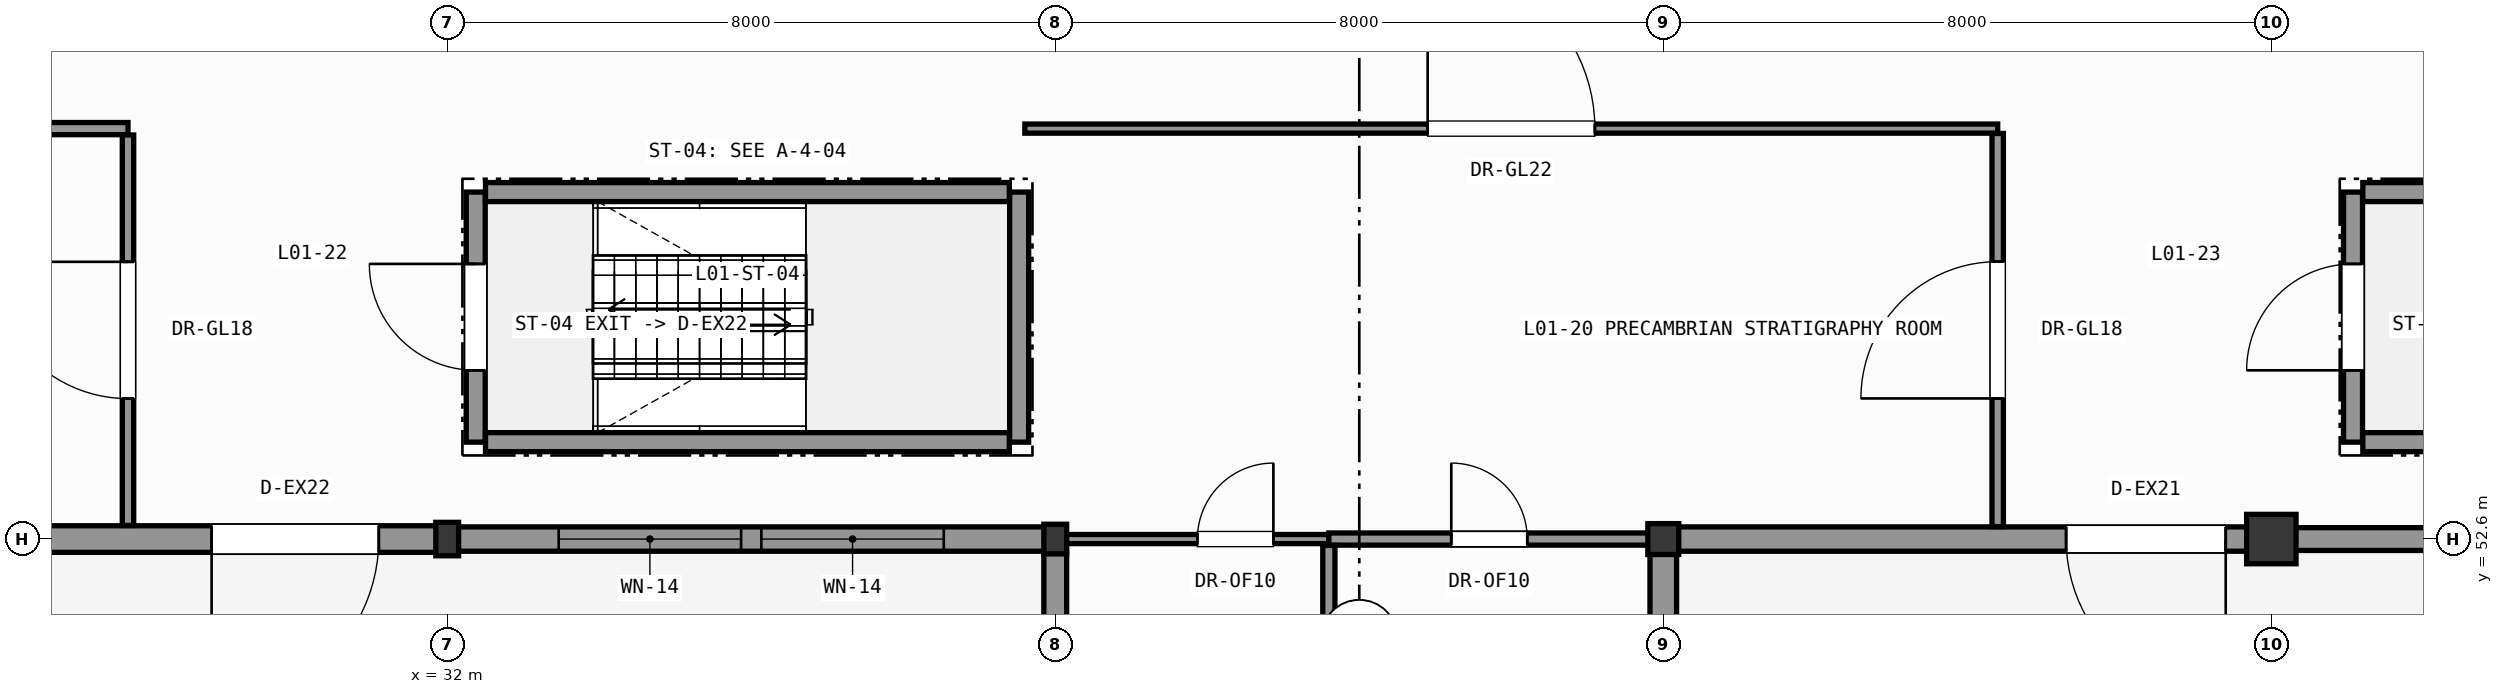
"""IFC4 building model, lengths in metres.
Left out: names, types, materials, properties, quantities, classifications, styles, units other than length and angle.
Written with IfcOpenShell. Run it as: python <this file> out.ifc"""

import sys

from ifc_helpers import new_model, si_unit, direction, frame, frame_2d, origin, origin_2d, place, context, subcontext, project, spatial, rectangle, hollow_circle, i_section, extrude, element, fill, save


model = new_model("IFC4")
c1 = context("Model", 3, precision=1e-05, world=origin(), true_north=direction((0.0, 1.0)))
c2 = subcontext(c1, "Body", "Model", "MODEL_VIEW")
j1 = project(units=[si_unit("LENGTHUNIT", "METRE"), si_unit("PLANEANGLEUNIT", "RADIAN")], contexts=[c1])
p1 = place(None, origin())
s1 = spatial("IfcSite", under=j1, at=p1, CompositionType="ELEMENT")
p2 = place(p1, origin())
s2 = spatial("IfcBuilding", under=s1, at=p2, CompositionType="ELEMENT")
p3 = place(p2, origin())
s3 = spatial("IfcBuildingStorey", under=s2, at=p3, CompositionType="ELEMENT", Elevation=0.0)
p4 = place(p3, frame((32.0, 52.6, 0.0), z_axis=(0.0, 0.0, 1.0), x_axis=(1.0, 0.0, 0.0)))
e1 = element("IfcColumn", 1, at=p4, inside=s3, PredefinedType="COLUMN", context=c2, shape_type="SweptSolid", body=[
    extrude(i_section(OverallWidth=0.3, OverallDepth=0.44, WebThickness=0.011, FlangeThickness=0.021, FilletRadius=0.027, at=origin_2d()), origin(), (0.0, 0.0, 1.0), 7.8),
])
p5 = place(p3, frame((40.0, 52.6, 0.0), z_axis=(0.0, 0.0, 1.0), x_axis=(1.0, 0.0, 0.0)))
e2 = element("IfcColumn", 2, at=p5, inside=s3, PredefinedType="COLUMN", context=c2, shape_type="SweptSolid", body=[
    extrude(i_section(OverallWidth=0.3, OverallDepth=0.39, WebThickness=0.011, FlangeThickness=0.019, FilletRadius=0.027, at=origin_2d()), origin(), (0.0, 0.0, 1.0), 7.8),
])
p6 = place(p3, frame((48.0, 52.6, 0.0), z_axis=(0.0, 0.0, 1.0), x_axis=(1.0, 0.0, 0.0)))
e3 = element("IfcColumn", 3, at=p6, inside=s3, PredefinedType="COLUMN", context=c2, shape_type="SweptSolid", body=[
    extrude(hollow_circle(Radius=0.203, WallThickness=0.02, at=origin_2d()), origin(), (0.0, 0.0, 1.0), 7.8),
])
p7 = place(p3, frame((56.0, 52.6, 0.0), z_axis=(0.0, 0.0, 1.0), x_axis=(1.0, 0.0, 0.0)))
e4 = element("IfcColumn", 4, at=p7, inside=s3, PredefinedType="PILASTER", context=c2, shape_type="SweptSolid", body=[
    extrude(rectangle(XDim=0.65, YDim=0.65, at=origin_2d()), origin(), (0.0, 0.0, 1.0), 7.8),
])
p8 = place(p3, frame((32.0, 52.6, 0.0), z_axis=(0.0, 0.0, 1.0), x_axis=(-1.0, 0.0, 0.0)))
e5 = element("IfcWall", 5, at=p8, inside=s3, PredefinedType="SOLIDWALL", context=c2, shape_type="SweptSolid", body=[
    extrude(rectangle(XDim=8.0, YDim=0.35, at=frame_2d((4.0, 0.0))), origin(), (0.0, 0.0, 1.0), 7.225),
])
p9 = place(p8, frame((0.9, 0.0, 0.0)))
e6 = element("IfcOpeningElement", 6, at=p9, cuts=e5, PredefinedType="OPENING", context=c2, shape_type="SweptSolid", body=[
    extrude(rectangle(XDim=2.2, YDim=2.7, at=frame_2d((1.1, 1.35))), frame((0.0, 0.185, 0.0), z_axis=(0.0, -1.0, 0.0), x_axis=(1.0, 0.0, 0.0)), (0.0, 0.0, 1.0), 0.37),
])
p10 = place(p3, frame((40.0, 52.6, 0.0), z_axis=(0.0, 0.0, 1.0), x_axis=(-1.0, 0.0, 0.0)))
e7 = element("IfcWall", 7, at=p10, inside=s3, PredefinedType="SOLIDWALL", context=c2, shape_type="SweptSolid", body=[
    extrude(rectangle(XDim=8.0, YDim=0.32, at=frame_2d((4.0, 0.0))), origin(), (0.0, 0.0, 1.0), 7.165),
])
p11 = place(p10, frame((1.467, 0.0, 0.95)))
e8 = element("IfcOpeningElement", 8, at=p11, cuts=e7, PredefinedType="OPENING", context=c2, shape_type="SweptSolid", body=[
    extrude(rectangle(XDim=2.4, YDim=3.0, at=frame_2d((1.2, 1.5))), frame((0.0, 0.17, 0.0), z_axis=(0.0, -1.0, 0.0), x_axis=(1.0, 0.0, 0.0)), (0.0, 0.0, 1.0), 0.34),
])
p12 = place(p10, frame((4.133, 0.0, 0.95)))
e9 = element("IfcOpeningElement", 9, at=p12, cuts=e7, PredefinedType="OPENING", context=c2, shape_type="SweptSolid", body=[
    extrude(rectangle(XDim=2.4, YDim=3.0, at=frame_2d((1.2, 1.5))), frame((0.0, 0.17, 0.0), z_axis=(0.0, -1.0, 0.0), x_axis=(1.0, 0.0, 0.0)), (0.0, 0.0, 1.0), 0.34),
])
p13 = place(p3, frame((40.0, 45.6, 0.0), z_axis=(0.0, 0.0, 1.0), x_axis=(0.0, 1.0, 0.0)))
e10 = element("IfcWall", 10, at=p13, inside=s3, PredefinedType="SOLIDWALL", context=c2, shape_type="SweptSolid", body=[
    extrude(rectangle(XDim=6.836, YDim=0.3, at=frame_2d((3.418, 0.0))), origin(), (0.0, 0.0, 1.0), 7.025),
])
p14 = place(p13, frame((2.218, 0.0, 0.95)))
e11 = element("IfcOpeningElement", 11, at=p14, cuts=e10, PredefinedType="OPENING", context=c2, shape_type="SweptSolid", body=[
    extrude(rectangle(XDim=2.4, YDim=4.6, at=frame_2d((1.2, 2.3))), frame((0.0, 0.16, 0.0), z_axis=(0.0, -1.0, 0.0), x_axis=(1.0, 0.0, 0.0)), (0.0, 0.0, 1.0), 0.32),
])
p15 = place(p3, frame((48.0, 52.6, 0.0), z_axis=(0.0, 0.0, 1.0), x_axis=(0.0, -1.0, 0.0)))
e12 = element("IfcWall", 12, at=p15, inside=s3, PredefinedType="SOLIDWALL", context=c2, shape_type="SweptSolid", body=[
    extrude(rectangle(XDim=7.0, YDim=0.35, at=frame_2d((3.5, 0.0))), origin(), (0.0, 0.0, 1.0), 7.025),
])
p16 = place(p15, frame((2.4, 0.0, 0.95)))
e13 = element("IfcOpeningElement", 13, at=p16, cuts=e12, PredefinedType="OPENING", context=c2, shape_type="SweptSolid", body=[
    extrude(rectangle(XDim=2.2, YDim=4.2, at=frame_2d((1.1, 2.1))), frame((0.0, 0.185, 0.0), z_axis=(0.0, -1.0, 0.0), x_axis=(1.0, 0.0, 0.0)), (0.0, 0.0, 1.0), 0.37),
])
p17 = place(p3, frame((56.0, 52.6, 0.0), z_axis=(0.0, 0.0, 1.0), x_axis=(-1.0, 0.0, 0.0)))
e14 = element("IfcWall", 14, at=p17, inside=s3, PredefinedType="SOLIDWALL", context=c2, shape_type="SweptSolid", body=[
    extrude(rectangle(XDim=7.821, YDim=0.32, at=frame_2d((3.911, 0.0))), origin(), (0.0, 0.0, 1.0), 7.075),
])
p18 = place(p17, frame((0.6, 0.0, 0.0)))
e15 = element("IfcOpeningElement", 15, at=p18, cuts=e14, PredefinedType="OPENING", context=c2, shape_type="SweptSolid", body=[
    extrude(rectangle(XDim=2.1, YDim=2.65, at=frame_2d((1.05, 1.325))), frame((0.0, 0.17, 0.0), z_axis=(0.0, -1.0, 0.0), x_axis=(1.0, 0.0, 0.0)), (0.0, 0.0, 1.0), 0.34),
])
p19 = place(p3, frame((70.0, 52.6, 0.0), z_axis=(0.0, 0.0, 1.0), x_axis=(-1.0, 0.0, 0.0)))
e16 = element("IfcWall", 16, at=p19, inside=s3, PredefinedType="SOLIDWALL", context=c2, shape_type="SweptSolid", body=[
    extrude(rectangle(XDim=14.0, YDim=0.3, at=frame_2d((7.0, 0.0))), origin(), (0.0, 0.0, 1.0), 6.925),
])
p20 = place(p19, frame((3.467, 0.0, 0.95)))
e17 = element("IfcOpeningElement", 17, at=p20, cuts=e16, PredefinedType="OPENING", context=c2, shape_type="SweptSolid", body=[
    extrude(rectangle(XDim=2.4, YDim=4.6, at=frame_2d((1.2, 2.3))), frame((0.0, 0.16, 0.0), z_axis=(0.0, -1.0, 0.0), x_axis=(1.0, 0.0, 0.0)), (0.0, 0.0, 1.0), 0.32),
])
p21 = place(p19, frame((8.133, 0.0, 0.95)))
e18 = element("IfcOpeningElement", 18, at=p21, cuts=e16, PredefinedType="OPENING", context=c2, shape_type="SweptSolid", body=[
    extrude(rectangle(XDim=2.4, YDim=4.6, at=frame_2d((1.2, 2.3))), frame((0.0, 0.16, 0.0), z_axis=(0.0, -1.0, 0.0), x_axis=(1.0, 0.0, 0.0)), (0.0, 0.0, 1.0), 0.32),
])
p22 = place(p3, frame((57.075, 53.875, 0.0), z_axis=(0.0, 0.0, 1.0), x_axis=(0.0, 1.0, 0.0)))
e19 = element("IfcWall", 19, at=p22, inside=s3, PredefinedType="SHEAR", context=c2, shape_type="SweptSolid", body=[
    extrude(rectangle(XDim=3.29, YDim=0.25, at=frame_2d((1.645, 0.0))), origin(), (0.0, 0.0, 1.0), 7.54),
])
p23 = place(p22, frame((0.945, 0.0, 0.0)))
e20 = element("IfcOpeningElement", 20, at=p23, cuts=e19, PredefinedType="OPENING", context=c2, shape_type="SweptSolid", body=[
    extrude(rectangle(XDim=1.4, YDim=2.2, at=frame_2d((0.7, 1.1))), frame((0.0, 0.135, 0.0), z_axis=(0.0, -1.0, 0.0), x_axis=(1.0, 0.0, 0.0)), (0.0, 0.0, 1.0), 0.27),
])
for number, where, z_axis, x_axis in (
    (21, (57.204, 53.875, 0.0), (0.0, 0.0, 1.0), (1.0, 0.0, 0.0)),
    (22, (57.204, 57.165, 0.0), (0.0, 0.0, 1.0), (1.0, 0.0, 0.0)),
):
    element("IfcWall", number, at=place(p3, frame(where, z_axis=z_axis, x_axis=x_axis)), inside=s3, PredefinedType="SHEAR", context=c2, shape_type="SweptSolid", body=[
        extrude(rectangle(XDim=7.192, YDim=0.25, at=frame_2d((3.596, 0.0))), origin(), (0.0, 0.0, 1.0), 7.54),
    ])
p24 = place(p3, frame((32.375, 53.875, 0.0), z_axis=(0.0, 0.0, 1.0), x_axis=(0.0, 1.0, 0.0)))
e23 = element("IfcWall", 23, at=p24, inside=s3, PredefinedType="SHEAR", context=c2, shape_type="SweptSolid", body=[
    extrude(rectangle(XDim=3.29, YDim=0.25, at=frame_2d((1.645, 0.0))), origin(), (0.0, 0.0, 1.0), 7.54),
])
p25 = place(p24, frame((0.945, 0.0, 0.0)))
e24 = element("IfcOpeningElement", 24, at=p25, cuts=e23, PredefinedType="OPENING", context=c2, shape_type="SweptSolid", body=[
    extrude(rectangle(XDim=1.4, YDim=2.2, at=frame_2d((0.7, 1.1))), frame((0.0, 0.135, 0.0), z_axis=(0.0, -1.0, 0.0), x_axis=(1.0, 0.0, 0.0)), (0.0, 0.0, 1.0), 0.27),
])
p26 = place(p3, frame((39.525, 53.875, 0.0), z_axis=(0.0, 0.0, 1.0), x_axis=(0.0, 1.0, 0.0)))
e25 = element("IfcWall", 25, at=p26, inside=s3, PredefinedType="SHEAR", context=c2, shape_type="SweptSolid", body=[
    extrude(rectangle(XDim=3.29, YDim=0.25, at=frame_2d((1.645, 0.0))), origin(), (0.0, 0.0, 1.0), 7.54),
])
for number, where, z_axis, x_axis in (
    (26, (32.504, 53.875, 0.0), (0.0, 0.0, 1.0), (1.0, 0.0, 0.0)),
    (27, (32.504, 57.165, 0.0), (0.0, 0.0, 1.0), (1.0, 0.0, 0.0)),
):
    element("IfcWall", number, at=place(p3, frame(where, z_axis=z_axis, x_axis=x_axis)), inside=s3, PredefinedType="SHEAR", context=c2, shape_type="SweptSolid", body=[
        extrude(rectangle(XDim=6.892, YDim=0.25, at=frame_2d((3.446, 0.0))), origin(), (0.0, 0.0, 1.0), 7.54),
    ])
p27 = place(p3, frame((39.6, 58.0, 0.0), z_axis=(0.0, 0.0, 1.0), x_axis=(1.0, 0.0, 0.0)))
e28 = element("IfcWall", 28, at=p27, inside=s3, PredefinedType="PARTITIONING", context=c2, shape_type="SweptSolid", body=[
    extrude(rectangle(XDim=12.8, YDim=0.12, at=frame_2d((6.4, 0.0))), origin(), (0.0, 0.0, 1.0), 7.54),
])
p28 = place(p27, frame((5.3, 0.0, 0.0)))
e29 = element("IfcOpeningElement", 29, at=p28, cuts=e28, PredefinedType="OPENING", context=c2, shape_type="SweptSolid", body=[
    extrude(rectangle(XDim=2.2, YDim=2.6, at=frame_2d((1.1, 1.3))), frame((0.0, 0.07, 0.0), z_axis=(0.0, -1.0, 0.0), x_axis=(1.0, 0.0, 0.0)), (0.0, 0.0, 1.0), 0.14),
])
p29 = place(p3, frame((0.179, 58.0, 0.0), z_axis=(0.0, 0.0, 1.0), x_axis=(1.0, 0.0, 0.0)))
e30 = element("IfcWall", 30, at=p29, inside=s3, PredefinedType="PARTITIONING", context=c2, shape_type="SweptSolid", body=[
    extrude(rectangle(XDim=27.621, YDim=0.16, at=frame_2d((13.811, 0.0))), origin(), (0.0, 0.0, 1.0), 7.54),
])
p30 = place(p29, frame((12.71, 0.0, 0.0)))
e31 = element("IfcOpeningElement", 31, at=p30, cuts=e30, PredefinedType="OPENING", context=c2, shape_type="SweptSolid", body=[
    extrude(rectangle(XDim=2.2, YDim=2.6, at=frame_2d((1.1, 1.3))), frame((0.0, 0.09, 0.0), z_axis=(0.0, -1.0, 0.0), x_axis=(1.0, 0.0, 0.0)), (0.0, 0.0, 1.0), 0.18),
])
p31 = place(p3, frame((52.4, 52.764, 0.0), z_axis=(0.0, 0.0, 1.0), x_axis=(0.0, 1.0, 0.0)))
e32 = element("IfcWall", 32, at=p31, inside=s3, PredefinedType="PARTITIONING", context=c2, shape_type="SweptSolid", body=[
    extrude(rectangle(XDim=5.172, YDim=0.15, at=frame_2d((2.586, 0.0))), origin(), (0.0, 0.0, 1.0), 7.54),
])
p32 = place(p31, frame((1.686, 0.0, 0.0)))
e33 = element("IfcOpeningElement", 33, at=p32, cuts=e32, PredefinedType="OPENING", context=c2, shape_type="SweptSolid", body=[
    extrude(rectangle(XDim=1.8, YDim=2.4, at=frame_2d((0.9, 1.2))), frame((0.0, 0.085, 0.0), z_axis=(0.0, -1.0, 0.0), x_axis=(1.0, 0.0, 0.0)), (0.0, 0.0, 1.0), 0.17),
])
p33 = place(p3, frame((40.0, 52.6, 0.0), z_axis=(0.0, 0.0, 1.0), x_axis=(1.0, 0.0, 0.0)))
e34 = element("IfcWall", 34, at=p33, inside=s3, PredefinedType="PARTITIONING", context=c2, shape_type="SweptSolid", body=[
    extrude(rectangle(XDim=3.6, YDim=0.12, at=frame_2d((1.8, 0.0))), origin(), (0.0, 0.0, 1.0), 7.075),
])
p34 = place(p33, frame((1.87, 0.0, 0.0)))
e35 = element("IfcOpeningElement", 35, at=p34, cuts=e34, PredefinedType="OPENING", context=c2, shape_type="SweptSolid", body=[
    extrude(rectangle(XDim=1.0, YDim=2.15, at=frame_2d((0.5, 1.075))), frame((0.0, 0.07, 0.0), z_axis=(0.0, -1.0, 0.0), x_axis=(1.0, 0.0, 0.0)), (0.0, 0.0, 1.0), 0.14),
])
p35 = place(p3, frame((43.6, 52.6, 0.0), z_axis=(0.0, 0.0, 1.0), x_axis=(1.0, 0.0, 0.0)))
e36 = element("IfcWall", 36, at=p35, inside=s3, PredefinedType="PARTITIONING", context=c2, shape_type="SweptSolid", body=[
    extrude(rectangle(XDim=4.221, YDim=0.16, at=frame_2d((2.11, 0.0))), origin(), (0.0, 0.0, 1.0), 7.075),
])
p36 = place(p35, frame((1.611, 0.0, 0.0)))
e37 = element("IfcOpeningElement", 37, at=p36, cuts=e36, PredefinedType="OPENING", context=c2, shape_type="SweptSolid", body=[
    extrude(rectangle(XDim=1.0, YDim=2.15, at=frame_2d((0.5, 1.075))), frame((0.0, 0.09, 0.0), z_axis=(0.0, -1.0, 0.0), x_axis=(1.0, 0.0, 0.0)), (0.0, 0.0, 1.0), 0.18),
])
p37 = place(p3, frame((27.8, 52.779, 0.0), z_axis=(0.0, 0.0, 1.0), x_axis=(0.0, 1.0, 0.0)))
e38 = element("IfcWall", 38, at=p37, inside=s3, PredefinedType="PARTITIONING", context=c2, shape_type="SweptSolid", body=[
    extrude(rectangle(XDim=5.137, YDim=0.15, at=frame_2d((2.568, 0.0))), origin(), (0.0, 0.0, 1.0), 7.54),
])
p38 = place(p37, frame((1.668, 0.0, 0.0)))
e39 = element("IfcOpeningElement", 39, at=p38, cuts=e38, PredefinedType="OPENING", context=c2, shape_type="SweptSolid", body=[
    extrude(rectangle(XDim=1.8, YDim=2.4, at=frame_2d((0.9, 1.2))), frame((0.0, 0.085, 0.0), z_axis=(0.0, -1.0, 0.0), x_axis=(1.0, 0.0, 0.0)), (0.0, 0.0, 1.0), 0.17),
])
p39 = place(p3, frame((43.6, 22.864, 0.0), z_axis=(0.0, 0.0, 1.0), x_axis=(0.0, 1.0, 0.0)))
e40 = element("IfcWall", 40, at=p39, inside=s3, PredefinedType="PARTITIONING", context=c2, shape_type="SweptSolid", body=[
    extrude(rectangle(XDim=29.652, YDim=0.16, at=frame_2d((14.826, 0.0))), origin(), (0.0, 0.0, 1.0), 7.54),
])
p40 = place(p39, frame((13.726, 0.0, 0.0)))
e41 = element("IfcOpeningElement", 41, at=p40, cuts=e40, PredefinedType="OPENING", context=c2, shape_type="SweptSolid", body=[
    extrude(rectangle(XDim=2.2, YDim=2.6, at=frame_2d((1.1, 1.3))), frame((0.0, 0.09, 0.0), z_axis=(0.0, -1.0, 0.0), x_axis=(1.0, 0.0, 0.0)), (0.0, 0.0, 1.0), 0.18),
])
p41 = place(p9, origin())
e42 = element("IfcDoor", 42, at=p41, inside=s3, OperationType="SINGLE_SWING_RIGHT", PredefinedType="DOOR", context=c2, shape_type="SweptSolid", body=[
    extrude(rectangle(XDim=2.2, YDim=2.7, at=frame_2d((1.1, 1.35))), frame((0.0, 0.025, 0.0), z_axis=(0.0, -1.0, 0.0), x_axis=(1.0, 0.0, 0.0)), (0.0, 0.0, 1.0), 0.05),
])
fill(e6, e42)
p42 = place(p11, origin())
e43 = element("IfcWindow", 43, at=p42, inside=s3, PartitioningType="SINGLE_PANEL", PredefinedType="WINDOW", context=c2, shape_type="SweptSolid", body=[
    extrude(rectangle(XDim=2.4, YDim=3.0, at=frame_2d((1.2, 1.5))), frame((0.0, 0.03, 0.0), z_axis=(0.0, -1.0, 0.0), x_axis=(1.0, 0.0, 0.0)), (0.0, 0.0, 1.0), 0.06),
])
fill(e8, e43)
p43 = place(p12, origin())
e44 = element("IfcWindow", 44, at=p43, inside=s3, PartitioningType="SINGLE_PANEL", PredefinedType="WINDOW", context=c2, shape_type="SweptSolid", body=[
    extrude(rectangle(XDim=2.4, YDim=3.0, at=frame_2d((1.2, 1.5))), frame((0.0, 0.03, 0.0), z_axis=(0.0, -1.0, 0.0), x_axis=(1.0, 0.0, 0.0)), (0.0, 0.0, 1.0), 0.06),
])
fill(e9, e44)
p44 = place(p18, origin())
e45 = element("IfcDoor", 45, at=p44, inside=s3, OperationType="SINGLE_SWING_LEFT", PredefinedType="DOOR", context=c2, shape_type="SweptSolid", body=[
    extrude(rectangle(XDim=2.1, YDim=2.65, at=frame_2d((1.05, 1.325))), frame((0.0, 0.025, 0.0), z_axis=(0.0, -1.0, 0.0), x_axis=(1.0, 0.0, 0.0)), (0.0, 0.0, 1.0), 0.05),
])
fill(e15, e45)
p45 = place(p23, origin())
e46 = element("IfcDoor", 46, at=p45, inside=s3, OperationType="SINGLE_SWING_LEFT", PredefinedType="DOOR", context=c2, shape_type="SweptSolid", body=[
    extrude(rectangle(XDim=1.4, YDim=2.2, at=frame_2d((0.7, 1.1))), frame((0.0, 0.025, 0.0), z_axis=(0.0, -1.0, 0.0), x_axis=(1.0, 0.0, 0.0)), (0.0, 0.0, 1.0), 0.05),
])
fill(e20, e46)
p46 = place(p25, origin())
e47 = element("IfcDoor", 47, at=p46, inside=s3, OperationType="SINGLE_SWING_RIGHT", PredefinedType="DOOR", context=c2, shape_type="SweptSolid", body=[
    extrude(rectangle(XDim=1.4, YDim=2.2, at=frame_2d((0.7, 1.1))), frame((0.0, 0.025, 0.0), z_axis=(0.0, -1.0, 0.0), x_axis=(1.0, 0.0, 0.0)), (0.0, 0.0, 1.0), 0.05),
])
fill(e24, e47)
p47 = place(p28, origin())
e48 = element("IfcDoor", 48, at=p47, inside=s3, OperationType="SINGLE_SWING_LEFT", PredefinedType="DOOR", context=c2, shape_type="SweptSolid", body=[
    extrude(rectangle(XDim=2.2, YDim=2.6, at=frame_2d((1.1, 1.3))), frame((0.0, 0.025, 0.0), z_axis=(0.0, -1.0, 0.0), x_axis=(1.0, 0.0, 0.0)), (0.0, 0.0, 1.0), 0.05),
])
fill(e29, e48)
p48 = place(p32, origin())
e49 = element("IfcDoor", 49, at=p48, inside=s3, OperationType="SINGLE_SWING_LEFT", PredefinedType="DOOR", context=c2, shape_type="SweptSolid", body=[
    extrude(rectangle(XDim=1.8, YDim=2.4, at=frame_2d((0.9, 1.2))), frame((0.0, 0.025, 0.0), z_axis=(0.0, -1.0, 0.0), x_axis=(1.0, 0.0, 0.0)), (0.0, 0.0, 1.0), 0.05),
])
fill(e33, e49)
p49 = place(p34, origin())
e50 = element("IfcDoor", 50, at=p49, inside=s3, OperationType="SINGLE_SWING_RIGHT", PredefinedType="DOOR", context=c2, shape_type="SweptSolid", body=[
    extrude(rectangle(XDim=1.0, YDim=2.15, at=frame_2d((0.5, 1.075))), frame((0.0, 0.025, 0.0), z_axis=(0.0, -1.0, 0.0), x_axis=(1.0, 0.0, 0.0)), (0.0, 0.0, 1.0), 0.05),
])
fill(e35, e50)
p50 = place(p36, origin())
e51 = element("IfcDoor", 51, at=p50, inside=s3, OperationType="SINGLE_SWING_LEFT", PredefinedType="DOOR", context=c2, shape_type="SweptSolid", body=[
    extrude(rectangle(XDim=1.0, YDim=2.15, at=frame_2d((0.5, 1.075))), frame((0.0, 0.025, 0.0), z_axis=(0.0, -1.0, 0.0), x_axis=(1.0, 0.0, 0.0)), (0.0, 0.0, 1.0), 0.05),
])
fill(e37, e51)
p51 = place(p38, origin())
e52 = element("IfcDoor", 52, at=p51, inside=s3, OperationType="SINGLE_SWING_RIGHT", PredefinedType="DOOR", context=c2, shape_type="SweptSolid", body=[
    extrude(rectangle(XDim=1.8, YDim=2.4, at=frame_2d((0.9, 1.2))), frame((0.0, 0.025, 0.0), z_axis=(0.0, -1.0, 0.0), x_axis=(1.0, 0.0, 0.0)), (0.0, 0.0, 1.0), 0.05),
])
fill(e39, e52)
save(model, sys.argv[1])
